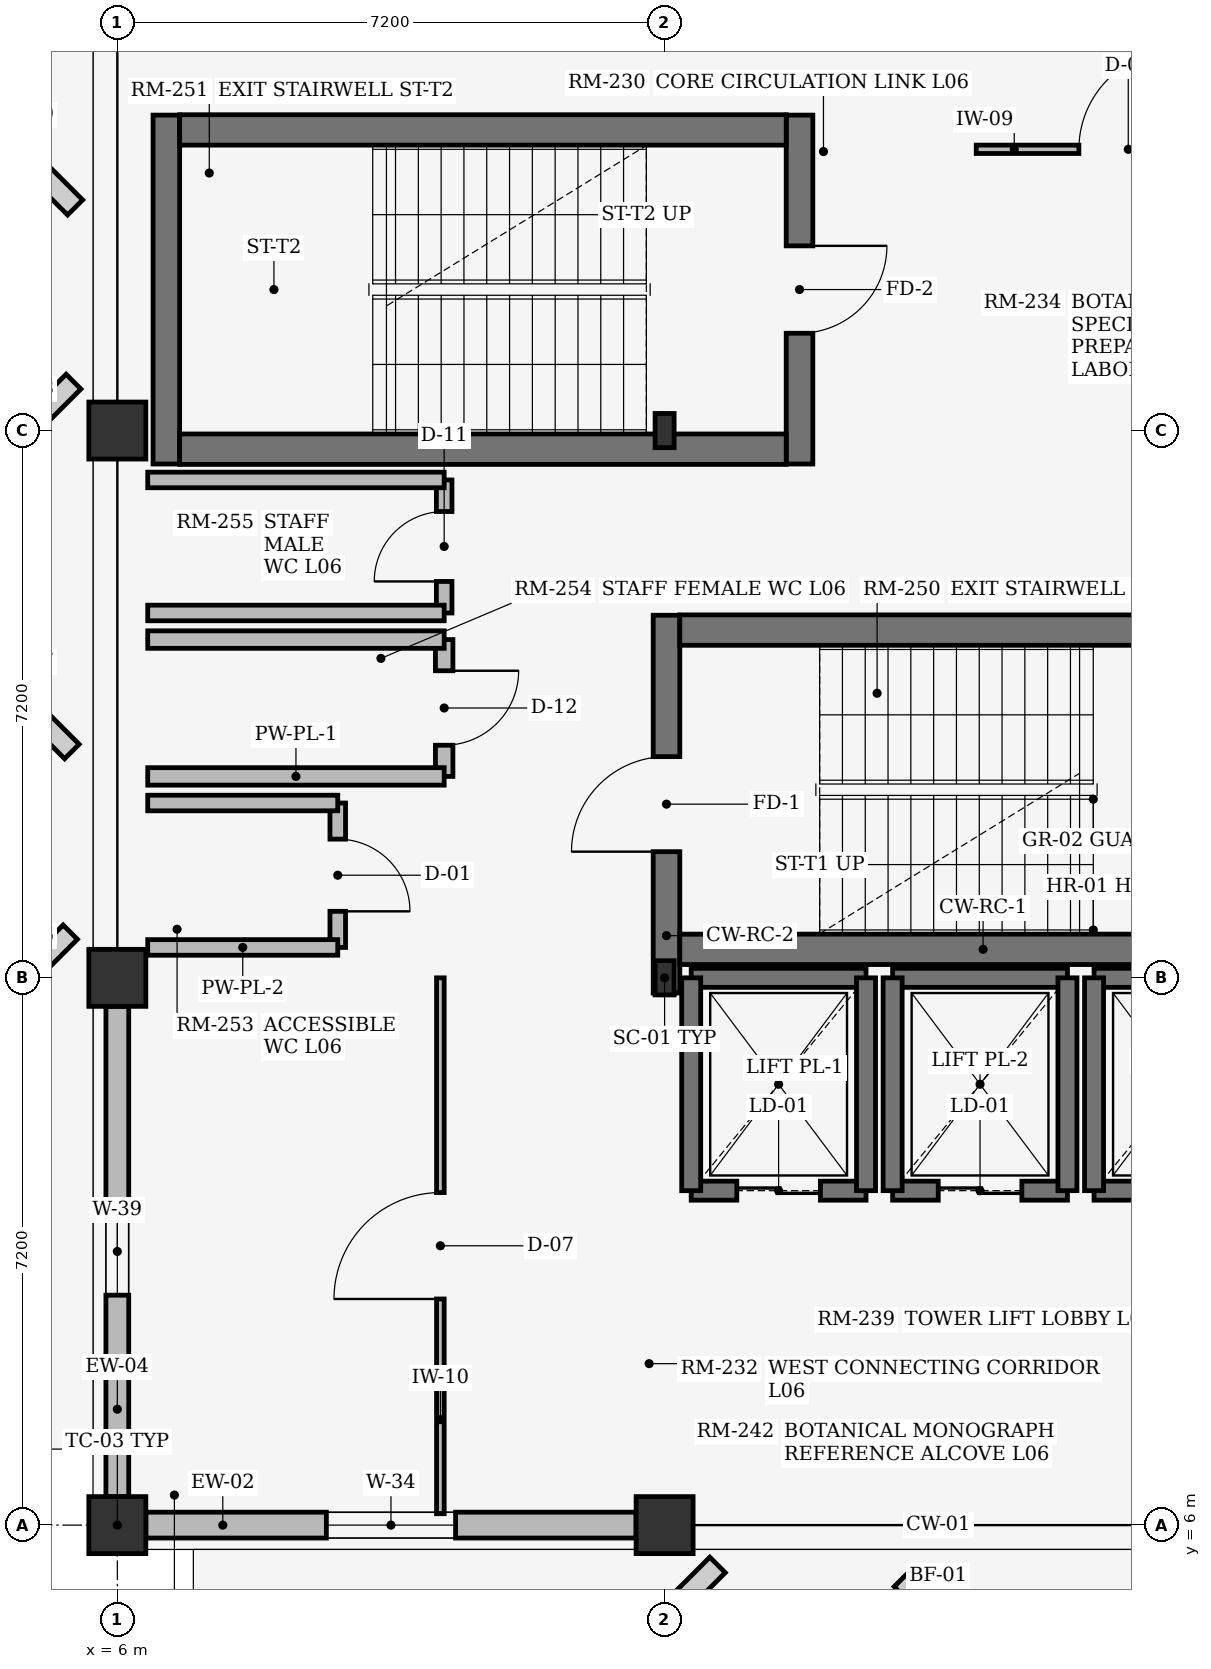
"""IFC4 building model, lengths in metres.
Left out: names, types, materials, properties, quantities, classifications, styles, units other than length and angle.
Written with IfcOpenShell. Run it as: python <this file> out.ifc"""

import sys

from ifc_helpers import new_model, si_unit, direction, frame, frame_2d, origin, origin_2d, place, context, subcontext, project, spatial, rectangle, i_section, extrude, element, fill, save


model = new_model("IFC4")
c1 = context("Model", 3, precision=1e-05, world=origin(), true_north=direction((0.0, 1.0)))
c2 = subcontext(c1, "Body", "Model", "MODEL_VIEW")
j1 = project(units=[si_unit("LENGTHUNIT", "METRE"), si_unit("PLANEANGLEUNIT", "RADIAN")], contexts=[c1])
p1 = place(None, origin())
s1 = spatial("IfcSite", under=j1, at=p1, CompositionType="ELEMENT")
p2 = place(p1, origin())
s2 = spatial("IfcBuilding", under=s1, at=p2, CompositionType="ELEMENT")
p3 = place(p2, frame((0.0, 0.0, 24.9)))
s3 = spatial("IfcBuildingStorey", under=s2, at=p3, CompositionType="ELEMENT", Elevation=24.9)
for number, where, z_axis, x_axis in (
    (1, (6.0, 6.0, 0.0), (0.0, 0.0, 1.0), (1.0, 0.0, 0.0)),
    (2, (6.0, 13.2, 0.0), (0.0, 0.0, 1.0), (1.0, 0.0, 0.0)),
    (3, (6.0, 20.4, 0.0), (0.0, 0.0, 1.0), (1.0, 0.0, 0.0)),
    (4, (13.2, 6.0, 0.0), (0.0, 0.0, 1.0), (1.0, 0.0, 0.0)),
):
    element("IfcColumn", number, at=place(p3, frame(where, z_axis=z_axis, x_axis=x_axis)), inside=s3, PredefinedType="COLUMN", context=c2, shape_type="SweptSolid", body=[
        extrude(rectangle(XDim=0.75, YDim=0.75, at=origin_2d()), origin(), (0.0, 0.0, 1.0), 3.65),
    ])
for number, where, z_axis, x_axis in (
    (5, (13.2, 13.2, 0.0), (0.0, 0.0, 1.0), (1.0, 0.0, 0.0)),
    (6, (13.2, 20.4, 0.0), (0.0, 0.0, 1.0), (1.0, 0.0, 0.0)),
):
    element("IfcColumn", number, at=place(p3, frame(where, z_axis=z_axis, x_axis=x_axis)), inside=s3, PredefinedType="COLUMN", context=c2, shape_type="SweptSolid", body=[
        extrude(i_section(OverallWidth=0.25, OverallDepth=0.45, WebThickness=0.011, FlangeThickness=0.014, at=origin_2d()), origin(), (0.0, 0.0, 1.0), 3.65),
    ])
p4 = place(p3, frame((6.375, 6.0, 0.0), z_axis=(0.0, 0.0, 1.0), x_axis=(1.0, 0.0, 0.0)))
e7 = element("IfcWall", 7, at=p4, inside=s3, PredefinedType="STANDARD", context=c2, shape_type="SweptSolid", body=[
    extrude(rectangle(XDim=6.45, YDim=0.34, at=frame_2d((3.225, 0.0))), origin(), (0.0, 0.0, 1.0), 3.13),
])
p5 = place(p4, frame((2.375, 0.0, 0.75)))
e8 = element("IfcOpeningElement", 8, at=p5, cuts=e7, PredefinedType="OPENING", context=c2, shape_type="SweptSolid", body=[
    extrude(rectangle(XDim=1.7, YDim=1.35, at=frame_2d((0.85, 0.675))), frame((0.0, 0.18, 0.0), z_axis=(0.0, -1.0, 0.0), x_axis=(1.0, 0.0, 0.0)), (0.0, 0.0, 1.0), 0.36),
])
p6 = place(p3, frame((6.0, 6.375, 0.0), z_axis=(0.0, 0.0, 1.0), x_axis=(0.0, 1.0, 0.0)))
e9 = element("IfcWall", 9, at=p6, inside=s3, PredefinedType="STANDARD", context=c2, shape_type="SweptSolid", body=[
    extrude(rectangle(XDim=6.45, YDim=0.3, at=frame_2d((3.225, 0.0))), origin(), (0.0, 0.0, 1.0), 3.13),
])
p7 = place(p6, frame((2.65, 0.0, 0.75)))
e10 = element("IfcOpeningElement", 10, at=p7, cuts=e9, PredefinedType="OPENING", context=c2, shape_type="SweptSolid", body=[
    extrude(rectangle(XDim=1.15, YDim=1.5, at=frame_2d((0.575, 0.75))), frame((0.0, 0.16, 0.0), z_axis=(0.0, -1.0, 0.0), x_axis=(1.0, 0.0, 0.0)), (0.0, 0.0, 1.0), 0.32),
])
p8 = place(p3, frame((13.225, 13.0, 0.0), z_axis=(0.0, 0.0, 1.0), x_axis=(0.0, 1.0, 0.0)))
e11 = element("IfcWall", 11, at=p8, inside=s3, PredefinedType="SHEAR", context=c2, shape_type="SweptSolid", body=[
    extrude(rectangle(XDim=4.97, YDim=0.35, at=frame_2d((2.485, 0.0))), origin(), (0.0, 0.0, 1.0), 3.65),
])
p9 = place(p8, frame((1.86, 0.0, 0.0)))
e12 = element("IfcOpeningElement", 12, at=p9, cuts=e11, PredefinedType="OPENING", context=c2, shape_type="SweptSolid", body=[
    extrude(rectangle(XDim=1.25, YDim=2.2, at=frame_2d((0.625, 1.1))), frame((0.0, 0.185, 0.0), z_axis=(0.0, -1.0, 0.0), x_axis=(1.0, 0.0, 0.0)), (0.0, 0.0, 1.0), 0.37),
])
for number, where, z_axis, x_axis in (
    (13, (13.4, 13.575, 0.0), (0.0, 0.0, 1.0), (1.0, 0.0, 0.0)),
    (14, (13.4, 17.775, 0.0), (0.0, 0.0, 1.0), (1.0, 0.0, 0.0)),
):
    element("IfcWall", number, at=place(p3, frame(where, z_axis=z_axis, x_axis=x_axis)), inside=s3, PredefinedType="SHEAR", context=c2, shape_type="SweptSolid", body=[
        extrude(rectangle(XDim=7.98, YDim=0.4, at=frame_2d((3.99, 0.0))), origin(), (0.0, 0.0, 1.0), 3.65),
    ])
p10 = place(p3, frame((14.975, 24.55, 0.0), z_axis=(0.0, 0.0, 1.0), x_axis=(0.0, -1.0, 0.0)))
e15 = element("IfcWall", 15, at=p10, inside=s3, PredefinedType="SHEAR", context=c2, shape_type="SweptSolid", body=[
    extrude(rectangle(XDim=4.59, YDim=0.35, at=frame_2d((2.295, 0.0))), origin(), (0.0, 0.0, 1.0), 3.65),
])
p11 = place(p10, frame((1.72, 0.0, 0.0)))
e16 = element("IfcOpeningElement", 16, at=p11, cuts=e15, PredefinedType="OPENING", context=c2, shape_type="SweptSolid", body=[
    extrude(rectangle(XDim=1.15, YDim=2.2, at=frame_2d((0.575, 1.1))), frame((0.0, 0.185, 0.0), z_axis=(0.0, -1.0, 0.0), x_axis=(1.0, 0.0, 0.0)), (0.0, 0.0, 1.0), 0.37),
])
p12 = place(p3, frame((6.645, 24.55, 0.0), z_axis=(0.0, 0.0, 1.0), x_axis=(0.0, -1.0, 0.0)))
e17 = element("IfcWall", 17, at=p12, inside=s3, PredefinedType="SHEAR", context=c2, shape_type="SweptSolid", body=[
    extrude(rectangle(XDim=4.59, YDim=0.35, at=frame_2d((2.295, 0.0))), origin(), (0.0, 0.0, 1.0), 3.65),
])
for number, where, z_axis, x_axis in (
    (18, (14.8, 24.355, 0.0), (0.0, 0.0, 1.0), (-1.0, 0.0, 0.0)),
    (19, (14.8, 20.155, 0.0), (0.0, 0.0, 1.0), (-1.0, 0.0, 0.0)),
):
    element("IfcWall", number, at=place(p3, frame(where, z_axis=z_axis, x_axis=x_axis)), inside=s3, PredefinedType="SHEAR", context=c2, shape_type="SweptSolid", body=[
        extrude(rectangle(XDim=7.98, YDim=0.4, at=frame_2d((3.99, 0.0))), origin(), (0.0, 0.0, 1.0), 3.65),
    ])
p13 = place(p3, frame((13.55, 10.4, 0.0), z_axis=(0.0, 0.0, 1.0), x_axis=(1.0, 0.0, 0.0)))
e20 = element("IfcWall", 20, at=p13, inside=s3, PredefinedType="SHEAR", context=c2, shape_type="SweptSolid", body=[
    extrude(rectangle(XDim=2.3, YDim=0.25, at=frame_2d((1.15, 0.0))), origin(), (0.0, 0.0, 1.0), 3.65),
])
p14 = place(p13, frame((0.6, 0.0, 0.0)))
e21 = element("IfcOpeningElement", 21, at=p14, cuts=e20, PredefinedType="OPENING", context=c2, shape_type="SweptSolid", body=[
    extrude(rectangle(XDim=1.1, YDim=2.2, at=frame_2d((0.55, 1.1))), frame((0.0, 0.135, 0.0), z_axis=(0.0, -1.0, 0.0), x_axis=(1.0, 0.0, 0.0)), (0.0, 0.0, 1.0), 0.27),
])
p15 = place(p3, frame((13.55, 13.2, 0.0), z_axis=(0.0, 0.0, 1.0), x_axis=(1.0, 0.0, 0.0)))
e22 = element("IfcWall", 22, at=p15, inside=s3, PredefinedType="SHEAR", context=c2, shape_type="SweptSolid", body=[
    extrude(rectangle(XDim=2.3, YDim=0.25, at=frame_2d((1.15, 0.0))), origin(), (0.0, 0.0, 1.0), 3.65),
])
for number, where, z_axis, x_axis in (
    (23, (13.55, 10.4, 0.0), (0.0, 0.0, 1.0), (0.0, 1.0, 0.0)),
    (24, (15.85, 10.4, 0.0), (0.0, 0.0, 1.0), (0.0, 1.0, 0.0)),
):
    element("IfcWall", number, at=place(p3, frame(where, z_axis=z_axis, x_axis=x_axis)), inside=s3, PredefinedType="SHEAR", context=c2, shape_type="SweptSolid", body=[
        extrude(rectangle(XDim=2.8, YDim=0.25, at=frame_2d((1.4, 0.0))), origin(), (0.0, 0.0, 1.0), 3.65),
    ])
p16 = place(p3, frame((16.2, 10.4, 0.0), z_axis=(0.0, 0.0, 1.0), x_axis=(1.0, 0.0, 0.0)))
e25 = element("IfcWall", 25, at=p16, inside=s3, PredefinedType="SHEAR", context=c2, shape_type="SweptSolid", body=[
    extrude(rectangle(XDim=2.3, YDim=0.25, at=frame_2d((1.15, 0.0))), origin(), (0.0, 0.0, 1.0), 3.65),
])
p17 = place(p16, frame((0.6, 0.0, 0.0)))
e26 = element("IfcOpeningElement", 26, at=p17, cuts=e25, PredefinedType="OPENING", context=c2, shape_type="SweptSolid", body=[
    extrude(rectangle(XDim=1.1, YDim=2.2, at=frame_2d((0.55, 1.1))), frame((0.0, 0.135, 0.0), z_axis=(0.0, -1.0, 0.0), x_axis=(1.0, 0.0, 0.0)), (0.0, 0.0, 1.0), 0.27),
])
p18 = place(p3, frame((16.2, 13.2, 0.0), z_axis=(0.0, 0.0, 1.0), x_axis=(1.0, 0.0, 0.0)))
e27 = element("IfcWall", 27, at=p18, inside=s3, PredefinedType="SHEAR", context=c2, shape_type="SweptSolid", body=[
    extrude(rectangle(XDim=2.3, YDim=0.25, at=frame_2d((1.15, 0.0))), origin(), (0.0, 0.0, 1.0), 3.65),
])
for number, where, z_axis, x_axis in (
    (28, (16.2, 10.4, 0.0), (0.0, 0.0, 1.0), (0.0, 1.0, 0.0)),
    (29, (18.5, 10.4, 0.0), (0.0, 0.0, 1.0), (0.0, 1.0, 0.0)),
):
    element("IfcWall", number, at=place(p3, frame(where, z_axis=z_axis, x_axis=x_axis)), inside=s3, PredefinedType="SHEAR", context=c2, shape_type="SweptSolid", body=[
        extrude(rectangle(XDim=2.8, YDim=0.25, at=frame_2d((1.4, 0.0))), origin(), (0.0, 0.0, 1.0), 3.65),
    ])
p19 = place(p3, frame((18.85, 10.4, 0.0), z_axis=(0.0, 0.0, 1.0), x_axis=(1.0, 0.0, 0.0)))
e30 = element("IfcWall", 30, at=p19, inside=s3, PredefinedType="SHEAR", context=c2, shape_type="SweptSolid", body=[
    extrude(rectangle(XDim=2.3, YDim=0.25, at=frame_2d((1.15, 0.0))), origin(), (0.0, 0.0, 1.0), 3.65),
])
p20 = place(p19, frame((0.6, 0.0, 0.0)))
e31 = element("IfcOpeningElement", 31, at=p20, cuts=e30, PredefinedType="OPENING", context=c2, shape_type="SweptSolid", body=[
    extrude(rectangle(XDim=1.1, YDim=2.2, at=frame_2d((0.55, 1.1))), frame((0.0, 0.135, 0.0), z_axis=(0.0, -1.0, 0.0), x_axis=(1.0, 0.0, 0.0)), (0.0, 0.0, 1.0), 0.27),
])
p21 = place(p3, frame((18.85, 13.2, 0.0), z_axis=(0.0, 0.0, 1.0), x_axis=(1.0, 0.0, 0.0)))
e32 = element("IfcWall", 32, at=p21, inside=s3, PredefinedType="SHEAR", context=c2, shape_type="SweptSolid", body=[
    extrude(rectangle(XDim=2.3, YDim=0.25, at=frame_2d((1.15, 0.0))), origin(), (0.0, 0.0, 1.0), 3.65),
])
p22 = place(p3, frame((18.85, 10.4, 0.0), z_axis=(0.0, 0.0, 1.0), x_axis=(0.0, 1.0, 0.0)))
e33 = element("IfcWall", 33, at=p22, inside=s3, PredefinedType="SHEAR", context=c2, shape_type="SweptSolid", body=[
    extrude(rectangle(XDim=2.8, YDim=0.25, at=frame_2d((1.4, 0.0))), origin(), (0.0, 0.0, 1.0), 3.65),
])
p23 = place(p3, frame((8.9, 13.6, 0.0), z_axis=(0.0, 0.0, 1.0), x_axis=(0.0, 1.0, 0.0)))
e34 = element("IfcWall", 34, at=p23, inside=s3, PredefinedType="PLUMBINGWALL", context=c2, shape_type="SweptSolid", body=[
    extrude(rectangle(XDim=1.9, YDim=0.205, at=frame_2d((0.95, 0.0))), origin(), (0.0, 0.0, 1.0), 3.63),
])
p24 = place(p23, frame((0.475, 0.0, 0.0)))
e35 = element("IfcOpeningElement", 35, at=p24, cuts=e34, PredefinedType="OPENING", context=c2, shape_type="SweptSolid", body=[
    extrude(rectangle(XDim=0.95, YDim=2.15, at=frame_2d((0.475, 1.075))), frame((0.0, 0.113, 0.0), z_axis=(0.0, -1.0, 0.0), x_axis=(1.0, 0.0, 0.0)), (0.0, 0.0, 1.0), 0.225),
])
for number, where, z_axis, x_axis in (
    (36, (6.4, 13.6, 0.0), (0.0, 0.0, 1.0), (1.0, 0.0, 0.0)),
    (37, (6.4, 15.5, 0.0), (0.0, 0.0, 1.0), (1.0, 0.0, 0.0)),
):
    element("IfcWall", number, at=place(p3, frame(where, z_axis=z_axis, x_axis=x_axis)), inside=s3, PredefinedType="PLUMBINGWALL", context=c2, shape_type="SweptSolid", body=[
        extrude(rectangle(XDim=2.5, YDim=0.205, at=frame_2d((1.25, 0.0))), origin(), (0.0, 0.0, 1.0), 3.63),
    ])
p25 = place(p3, frame((10.3, 15.85, 0.0), z_axis=(0.0, 0.0, 1.0), x_axis=(0.0, 1.0, 0.0)))
e38 = element("IfcWall", 38, at=p25, inside=s3, PredefinedType="PLUMBINGWALL", context=c2, shape_type="SweptSolid", body=[
    extrude(rectangle(XDim=1.8, YDim=0.23, at=frame_2d((0.9, 0.0))), origin(), (0.0, 0.0, 1.0), 3.63),
])
p26 = place(p25, frame((0.41, 0.0, 0.0)))
e39 = element("IfcOpeningElement", 39, at=p26, cuts=e38, PredefinedType="OPENING", context=c2, shape_type="SweptSolid", body=[
    extrude(rectangle(XDim=0.98, YDim=2.1, at=frame_2d((0.49, 1.05))), frame((0.0, 0.125, 0.0), z_axis=(0.0, -1.0, 0.0), x_axis=(1.0, 0.0, 0.0)), (0.0, 0.0, 1.0), 0.25),
])
for number, where, z_axis, x_axis in (
    (40, (6.4, 15.85, 0.0), (0.0, 0.0, 1.0), (1.0, 0.0, 0.0)),
    (41, (6.4, 17.65, 0.0), (0.0, 0.0, 1.0), (1.0, 0.0, 0.0)),
):
    element("IfcWall", number, at=place(p3, frame(where, z_axis=z_axis, x_axis=x_axis)), inside=s3, PredefinedType="PLUMBINGWALL", context=c2, shape_type="SweptSolid", body=[
        extrude(rectangle(XDim=3.9, YDim=0.23, at=frame_2d((1.95, 0.0))), origin(), (0.0, 0.0, 1.0), 3.63),
    ])
p27 = place(p3, frame((10.3, 18.0, 0.0), z_axis=(0.0, 0.0, 1.0), x_axis=(0.0, 1.0, 0.0)))
e42 = element("IfcWall", 42, at=p27, inside=s3, PredefinedType="PLUMBINGWALL", context=c2, shape_type="SweptSolid", body=[
    extrude(rectangle(XDim=1.75, YDim=0.205, at=frame_2d((0.875, 0.0))), origin(), (0.0, 0.0, 1.0), 3.63),
])
p28 = place(p27, frame((0.415, 0.0, 0.0)))
e43 = element("IfcOpeningElement", 43, at=p28, cuts=e42, PredefinedType="OPENING", context=c2, shape_type="SweptSolid", body=[
    extrude(rectangle(XDim=0.92, YDim=2.1, at=frame_2d((0.46, 1.05))), frame((0.0, 0.113, 0.0), z_axis=(0.0, -1.0, 0.0), x_axis=(1.0, 0.0, 0.0)), (0.0, 0.0, 1.0), 0.225),
])
for number, where, z_axis, x_axis in (
    (44, (6.4, 18.0, 0.0), (0.0, 0.0, 1.0), (1.0, 0.0, 0.0)),
    (45, (6.4, 19.75, 0.0), (0.0, 0.0, 1.0), (1.0, 0.0, 0.0)),
):
    element("IfcWall", number, at=place(p3, frame(where, z_axis=z_axis, x_axis=x_axis)), inside=s3, PredefinedType="PLUMBINGWALL", context=c2, shape_type="SweptSolid", body=[
        extrude(rectangle(XDim=3.9, YDim=0.205, at=frame_2d((1.95, 0.0))), origin(), (0.0, 0.0, 1.0), 3.63),
    ])
p29 = place(p3, frame((17.3, 24.1, 0.0), z_axis=(0.0, 0.0, 1.0), x_axis=(1.0, 0.0, 0.0)))
e46 = element("IfcWall", 46, at=p29, inside=s3, PredefinedType="PARTITIONING", context=c2, shape_type="SweptSolid", body=[
    extrude(rectangle(XDim=4.0, YDim=0.11, at=frame_2d((2.0, 0.0))), origin(), (0.0, 0.0, 1.0), 3.63),
])
p30 = place(p29, frame((1.35, 0.0, 0.0)))
e47 = element("IfcOpeningElement", 47, at=p30, cuts=e46, PredefinedType="OPENING", context=c2, shape_type="SweptSolid", body=[
    extrude(rectangle(XDim=1.3, YDim=2.2, at=frame_2d((0.65, 1.1))), frame((0.0, 0.065, 0.0), z_axis=(0.0, -1.0, 0.0), x_axis=(1.0, 0.0, 0.0)), (0.0, 0.0, 1.0), 0.13),
])
p31 = place(p3, frame((10.25, 6.15, 0.0), z_axis=(0.0, 0.0, 1.0), x_axis=(0.0, 1.0, 0.0)))
e48 = element("IfcWall", 48, at=p31, inside=s3, PredefinedType="PARTITIONING", context=c2, shape_type="SweptSolid", body=[
    extrude(rectangle(XDim=7.05, YDim=0.1, at=frame_2d((3.525, 0.0))), origin(), (0.0, 0.0, 1.0), 3.63),
])
p32 = place(p31, frame((2.825, 0.0, 0.0)))
e49 = element("IfcOpeningElement", 49, at=p32, cuts=e48, PredefinedType="OPENING", context=c2, shape_type="SweptSolid", body=[
    extrude(rectangle(XDim=1.4, YDim=2.25, at=frame_2d((0.7, 1.125))), frame((0.0, 0.06, 0.0), z_axis=(0.0, -1.0, 0.0), x_axis=(1.0, 0.0, 0.0)), (0.0, 0.0, 1.0), 0.12),
])
p33 = place(p5, origin())
e50 = element("IfcWindow", 50, at=p33, inside=s3, PartitioningType="SINGLE_PANEL", PredefinedType="WINDOW", context=c2, shape_type="SweptSolid", body=[
    extrude(rectangle(XDim=1.7, YDim=1.35, at=frame_2d((0.85, 0.675))), frame((0.0, 0.03, 0.0), z_axis=(0.0, -1.0, 0.0), x_axis=(1.0, 0.0, 0.0)), (0.0, 0.0, 1.0), 0.06),
])
fill(e8, e50)
p34 = place(p7, origin())
e51 = element("IfcWindow", 51, at=p34, inside=s3, PartitioningType="SINGLE_PANEL", PredefinedType="WINDOW", context=c2, shape_type="SweptSolid", body=[
    extrude(rectangle(XDim=1.15, YDim=1.5, at=frame_2d((0.575, 0.75))), frame((0.0, 0.03, 0.0), z_axis=(0.0, -1.0, 0.0), x_axis=(1.0, 0.0, 0.0)), (0.0, 0.0, 1.0), 0.06),
])
fill(e10, e51)
p35 = place(p9, origin())
e52 = element("IfcDoor", 52, at=p35, inside=s3, OperationType="SINGLE_SWING_LEFT", PredefinedType="DOOR", context=c2, shape_type="SweptSolid", body=[
    extrude(rectangle(XDim=1.25, YDim=2.2, at=frame_2d((0.625, 1.1))), frame((0.0, 0.025, 0.0), z_axis=(0.0, -1.0, 0.0), x_axis=(1.0, 0.0, 0.0)), (0.0, 0.0, 1.0), 0.05),
])
fill(e12, e52)
p36 = place(p11, origin())
e53 = element("IfcDoor", 53, at=p36, inside=s3, OperationType="SINGLE_SWING_LEFT", PredefinedType="DOOR", context=c2, shape_type="SweptSolid", body=[
    extrude(rectangle(XDim=1.15, YDim=2.2, at=frame_2d((0.575, 1.1))), frame((0.0, 0.025, 0.0), z_axis=(0.0, -1.0, 0.0), x_axis=(1.0, 0.0, 0.0)), (0.0, 0.0, 1.0), 0.05),
])
fill(e16, e53)
p37 = place(p14, origin())
e54 = element("IfcDoor", 54, at=p37, inside=s3, OperationType="DOUBLE_DOOR_SLIDING", PredefinedType="DOOR", context=c2, shape_type="SweptSolid", body=[
    extrude(rectangle(XDim=1.1, YDim=2.2, at=frame_2d((0.55, 1.1))), frame((0.0, 0.025, 0.0), z_axis=(0.0, -1.0, 0.0), x_axis=(1.0, 0.0, 0.0)), (0.0, 0.0, 1.0), 0.05),
])
fill(e21, e54)
p38 = place(p17, origin())
e55 = element("IfcDoor", 55, at=p38, inside=s3, OperationType="DOUBLE_DOOR_SLIDING", PredefinedType="DOOR", context=c2, shape_type="SweptSolid", body=[
    extrude(rectangle(XDim=1.1, YDim=2.2, at=frame_2d((0.55, 1.1))), frame((0.0, 0.025, 0.0), z_axis=(0.0, -1.0, 0.0), x_axis=(1.0, 0.0, 0.0)), (0.0, 0.0, 1.0), 0.05),
])
fill(e26, e55)
p39 = place(p24, frame((0.95, 0.0, 0.0), z_axis=(0.0, 0.0, 1.0), x_axis=(-1.0, 0.0, 0.0)))
e56 = element("IfcDoor", 56, at=p39, inside=s3, OperationType="SINGLE_SWING_LEFT", PredefinedType="DOOR", context=c2, shape_type="SweptSolid", body=[
    extrude(rectangle(XDim=0.95, YDim=2.15, at=frame_2d((0.475, 1.075))), frame((0.0, 0.025, 0.0), z_axis=(0.0, -1.0, 0.0), x_axis=(1.0, 0.0, 0.0)), (0.0, 0.0, 1.0), 0.05),
])
fill(e35, e56)
p40 = place(p26, origin())
e57 = element("IfcDoor", 57, at=p40, inside=s3, OperationType="SINGLE_SWING_RIGHT", PredefinedType="DOOR", context=c2, shape_type="SweptSolid", body=[
    extrude(rectangle(XDim=0.98, YDim=2.1, at=frame_2d((0.49, 1.05))), frame((0.0, 0.025, 0.0), z_axis=(0.0, -1.0, 0.0), x_axis=(1.0, 0.0, 0.0)), (0.0, 0.0, 1.0), 0.05),
])
fill(e39, e57)
p41 = place(p28, origin())
e58 = element("IfcDoor", 58, at=p41, inside=s3, OperationType="SINGLE_SWING_LEFT", PredefinedType="DOOR", context=c2, shape_type="SweptSolid", body=[
    extrude(rectangle(XDim=0.92, YDim=2.1, at=frame_2d((0.46, 1.05))), frame((0.0, 0.025, 0.0), z_axis=(0.0, -1.0, 0.0), x_axis=(1.0, 0.0, 0.0)), (0.0, 0.0, 1.0), 0.05),
])
fill(e43, e58)
p42 = place(p30, frame((1.3, 0.0, 0.0), z_axis=(0.0, 0.0, 1.0), x_axis=(-1.0, 0.0, 0.0)))
e59 = element("IfcDoor", 59, at=p42, inside=s3, OperationType="SINGLE_SWING_RIGHT", PredefinedType="DOOR", context=c2, shape_type="SweptSolid", body=[
    extrude(rectangle(XDim=1.3, YDim=2.2, at=frame_2d((0.65, 1.1))), frame((0.0, 0.025, 0.0), z_axis=(0.0, -1.0, 0.0), x_axis=(1.0, 0.0, 0.0)), (0.0, 0.0, 1.0), 0.05),
])
fill(e47, e59)
p43 = place(p32, origin())
e60 = element("IfcDoor", 60, at=p43, inside=s3, OperationType="SINGLE_SWING_LEFT", PredefinedType="DOOR", context=c2, shape_type="SweptSolid", body=[
    extrude(rectangle(XDim=1.4, YDim=2.25, at=frame_2d((0.7, 1.125))), frame((0.0, 0.025, 0.0), z_axis=(0.0, -1.0, 0.0), x_axis=(1.0, 0.0, 0.0)), (0.0, 0.0, 1.0), 0.05),
])
fill(e49, e60)
save(model, sys.argv[1])
